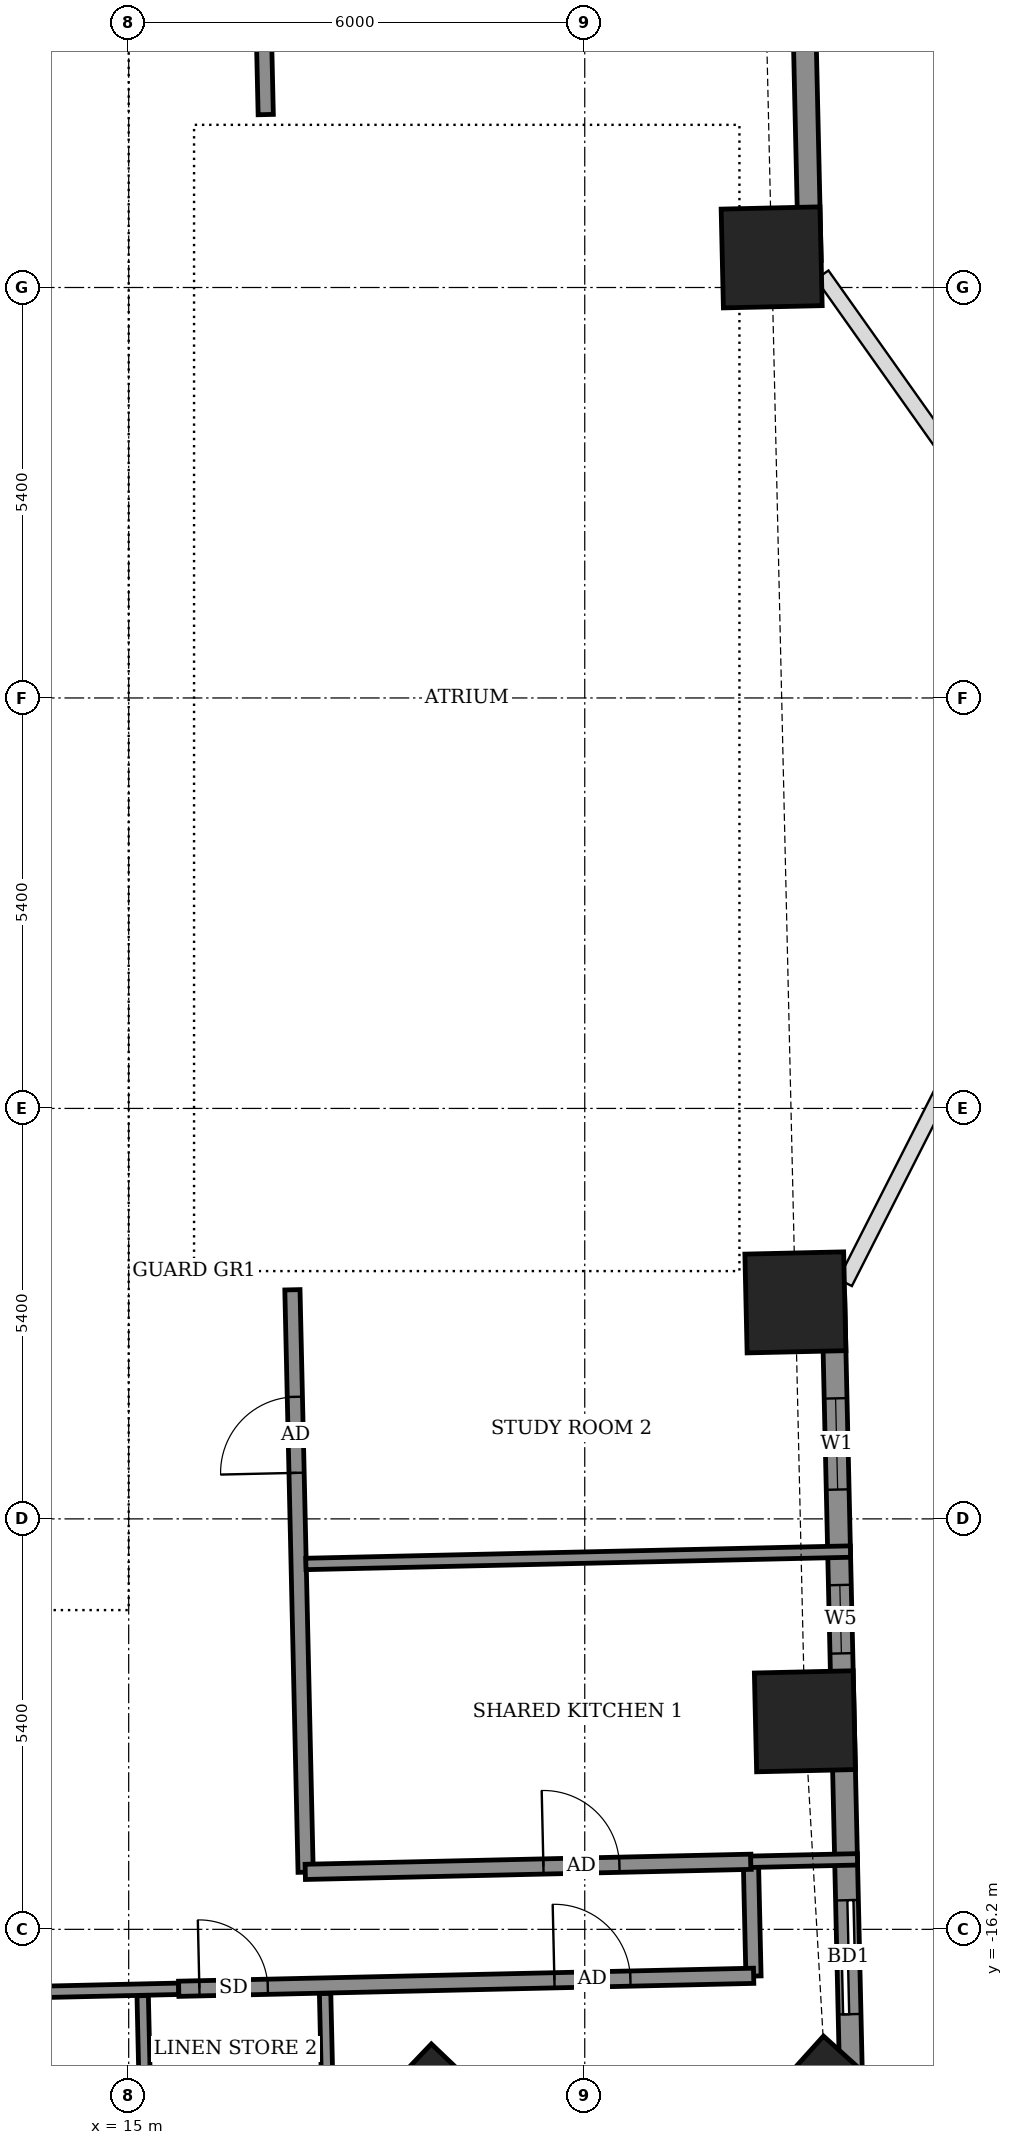
"""IFC4 building model, lengths in metres.
Left out: names, types, materials, properties, quantities, classifications, styles, units other than length and angle.
Written with IfcOpenShell. Run it as: python <this file> out.ifc"""

import sys

from ifc_helpers import new_model, si_unit, direction, frame, frame_2d, origin, origin_2d, place, context, subcontext, project, spatial, rectangle, extrude, element, fill, save


model = new_model("IFC4")
c1 = context("Model", 3, precision=1e-05, world=origin(), true_north=direction((0.0, 1.0)))
c2 = subcontext(c1, "Body", "Model", "MODEL_VIEW")
j1 = project(units=[si_unit("LENGTHUNIT", "METRE"), si_unit("PLANEANGLEUNIT", "RADIAN")], contexts=[c1])
p1 = place(None, origin())
s1 = spatial("IfcSite", under=j1, at=p1, CompositionType="ELEMENT")
p2 = place(p1, origin())
s2 = spatial("IfcBuilding", under=s1, at=p2, CompositionType="ELEMENT")
p3 = place(p2, frame((0.0, 0.0, 130.1)))
s3 = spatial("IfcBuildingStorey", under=s2, at=p3, CompositionType="ELEMENT", Elevation=130.1)
for number, where, z_axis, x_axis in (
    (1, (19.003, -18.627, -0.55), (0.0, 0.0, 1.0), (0.691, 0.723, 0.0)),
    (2, (24.188, -18.523, -0.55), (0.0, 0.0, 1.0), (0.67, 0.743, 0.0)),
    (3, (23.896, -13.463, -0.55), (0.0, 0.0, 1.0), (-0.023, 1.0, 0.0)),
    (4, (23.771, -7.952, -0.55), (0.0, 0.0, 1.0), (-0.023, 1.0, 0.0)),
    (5, (23.459, 5.796, -0.55), (0.0, 0.0, 1.0), (-0.023, 1.0, 0.0)),
):
    element("IfcColumn", number, at=place(p3, frame(where, z_axis=z_axis, x_axis=x_axis)), inside=s3, PredefinedType="COLUMN", context=c2, shape_type="SweptSolid", body=[
        extrude(rectangle(XDim=1.3, YDim=1.3, at=origin_2d()), origin(), (0.0, 0.0, 1.0), 3.6),
    ])
p4 = place(p3, frame((24.518, -18.812, 0.0), z_axis=(0.0, 0.0, 1.0), x_axis=(-0.02269451316, 0.999742446369, 0.0)))
e6 = element("IfcWall", 6, at=p4, inside=s3, PredefinedType="SOLIDWALL", context=c2, shape_type="SweptSolid", body=[
    extrude(rectangle(XDim=10.93, YDim=0.3, at=frame_2d((5.465, 0.0))), origin(), (0.0, 0.0, 1.0), 3.05),
])
p5 = place(p4, frame((1.496, 0.0, 0.0)))
e7 = element("IfcOpeningElement", 7, at=p5, cuts=e6, PredefinedType="OPENING", context=c2, shape_type="SweptSolid", body=[
    extrude(rectangle(XDim=1.5, YDim=2.4, at=frame_2d((0.75, 1.2))), frame((0.0, 0.16, 0.0), z_axis=(0.0, -1.0, 0.0), x_axis=(1.0, 0.0, 0.0)), (0.0, 0.0, 1.0), 0.32),
])
p6 = place(p4, frame((6.244, 0.0, 0.9)))
e8 = element("IfcOpeningElement", 8, at=p6, cuts=e6, PredefinedType="OPENING", context=c2, shape_type="SweptSolid", body=[
    extrude(rectangle(XDim=0.9, YDim=1.5, at=frame_2d((0.45, 0.75))), frame((0.0, 0.16, 0.0), z_axis=(0.0, -1.0, 0.0), x_axis=(1.0, 0.0, 0.0)), (0.0, 0.0, 1.0), 0.32),
])
p7 = place(p4, frame((8.4, 0.0, 0.9)))
e9 = element("IfcOpeningElement", 9, at=p7, cuts=e6, PredefinedType="OPENING", context=c2, shape_type="SweptSolid", body=[
    extrude(rectangle(XDim=1.2, YDim=1.5, at=frame_2d((0.6, 0.75))), frame((0.0, 0.16, 0.0), z_axis=(0.0, -1.0, 0.0), x_axis=(1.0, 0.0, 0.0)), (0.0, 0.0, 1.0), 0.32),
])
p8 = place(p3, frame((23.961, 5.752, 0.0), z_axis=(0.0, 0.0, 1.0), x_axis=(-0.022715362207, 0.999741972871, 0.0)))
e10 = element("IfcWall", 10, at=p8, inside=s3, PredefinedType="SOLIDWALL", context=c2, shape_type="SweptSolid", body=[
    extrude(rectangle(XDim=11.93, YDim=0.3, at=frame_2d((5.965, 0.0))), origin(), (0.0, 0.0, 1.0), 3.05),
])
p9 = place(p8, frame((3.228, 0.0, 0.0)))
e11 = element("IfcOpeningElement", 11, at=p9, cuts=e10, PredefinedType="OPENING", context=c2, shape_type="SweptSolid", body=[
    extrude(rectangle(XDim=1.5, YDim=2.4, at=frame_2d((0.75, 1.2))), frame((0.0, 0.16, 0.0), z_axis=(0.0, -1.0, 0.0), x_axis=(1.0, 0.0, 0.0)), (0.0, 0.0, 1.0), 0.32),
])
p10 = place(p8, frame((7.629, 0.0, 0.9)))
e12 = element("IfcOpeningElement", 12, at=p10, cuts=e10, PredefinedType="OPENING", context=c2, shape_type="SweptSolid", body=[
    extrude(rectangle(XDim=0.9, YDim=1.5, at=frame_2d((0.45, 0.75))), frame((0.0, 0.16, 0.0), z_axis=(0.0, -1.0, 0.0), x_axis=(1.0, 0.0, 0.0)), (0.0, 0.0, 1.0), 0.32),
])
p11 = place(p8, frame((9.316, 0.0, 0.9)))
e13 = element("IfcOpeningElement", 13, at=p11, cuts=e10, PredefinedType="OPENING", context=c2, shape_type="SweptSolid", body=[
    extrude(rectangle(XDim=1.2, YDim=1.5, at=frame_2d((0.6, 0.75))), frame((0.0, 0.16, 0.0), z_axis=(0.0, -1.0, 0.0), x_axis=(1.0, 0.0, 0.0)), (0.0, 0.0, 1.0), 0.32),
])
p12 = place(p3, frame((15.343, -24.072, 0.0), z_axis=(0.0, 0.0, 1.0), x_axis=(-0.022699227919, 0.999742339331, 0.0)))
e14 = element("IfcWall", 14, at=p12, inside=s3, PredefinedType="PARTITIONING", context=c2, shape_type="SweptSolid", body=[
    extrude(rectangle(XDim=7.002, YDim=0.15, at=frame_2d((3.501, 0.0))), origin(), (0.0, 0.0, 1.0), 2.55),
])
p13 = place(p3, frame((17.632, -19.142, 0.0), z_axis=(0.0, 0.0, 1.0), x_axis=(-0.022906293375, 0.999737616439, 0.0)))
e15 = element("IfcWall", 15, at=p13, inside=s3, PredefinedType="PARTITIONING", context=c2, shape_type="SweptSolid", body=[
    extrude(rectangle(XDim=2.1, YDim=0.15, at=frame_2d((1.05, 0.0))), origin(), (0.0, 0.0, 1.0), 3.05),
])
p14 = place(p3, frame((23.22, -16.815, 0.0), z_axis=(0.0, 0.0, 1.0), x_axis=(-0.022617910375, 0.999744182344, 0.0)))
e16 = element("IfcWall", 16, at=p14, inside=s3, PredefinedType="PARTITIONING", context=c2, shape_type="SweptSolid", body=[
    extrude(rectangle(XDim=1.5, YDim=0.2, at=frame_2d((0.75, 0.0))), origin(), (0.0, 0.0, 1.0), 3.05),
])
p15 = place(p3, frame((-14.871, -17.675, 0.0), z_axis=(0.0, 0.0, 1.0), x_axis=(0.999742359486, 0.02269834024, 0.0)))
e17 = element("IfcWall", 17, at=p15, inside=s3, PredefinedType="PARTITIONING", context=c2, shape_type="SweptSolid", body=[
    extrude(rectangle(XDim=30.536, YDim=0.15, at=frame_2d((15.268, 0.0))), origin(), (0.0, 0.0, 1.0), 3.05),
])
p16 = place(p15, frame((1.034, 0.0, 0.0)))
e18 = element("IfcOpeningElement", 18, at=p16, cuts=e17, PredefinedType="OPENING", context=c2, shape_type="SweptSolid", body=[
    extrude(rectangle(XDim=0.9, YDim=2.1, at=frame_2d((0.45, 1.05))), frame((0.0, 0.085, 0.0), z_axis=(0.0, -1.0, 0.0), x_axis=(1.0, 0.0, 0.0)), (0.0, 0.0, 1.0), 0.17),
])
p17 = place(p15, frame((7.659, 0.0, 0.0)))
e19 = element("IfcOpeningElement", 19, at=p17, cuts=e17, PredefinedType="OPENING", context=c2, shape_type="SweptSolid", body=[
    extrude(rectangle(XDim=0.9, YDim=2.1, at=frame_2d((0.45, 1.05))), frame((0.0, 0.085, 0.0), z_axis=(0.0, -1.0, 0.0), x_axis=(1.0, 0.0, 0.0)), (0.0, 0.0, 1.0), 0.17),
])
p18 = place(p15, frame((9.459, 0.0, 0.0)))
e20 = element("IfcOpeningElement", 20, at=p18, cuts=e17, PredefinedType="OPENING", context=c2, shape_type="SweptSolid", body=[
    extrude(rectangle(XDim=0.9, YDim=2.1, at=frame_2d((0.45, 1.05))), frame((0.0, 0.085, 0.0), z_axis=(0.0, -1.0, 0.0), x_axis=(1.0, 0.0, 0.0)), (0.0, 0.0, 1.0), 0.17),
])
p19 = place(p15, frame((16.084, 0.0, 0.0)))
e21 = element("IfcOpeningElement", 21, at=p19, cuts=e17, PredefinedType="OPENING", context=c2, shape_type="SweptSolid", body=[
    extrude(rectangle(XDim=0.9, YDim=2.1, at=frame_2d((0.45, 1.05))), frame((0.0, 0.085, 0.0), z_axis=(0.0, -1.0, 0.0), x_axis=(1.0, 0.0, 0.0)), (0.0, 0.0, 1.0), 0.17),
])
p20 = place(p15, frame((17.909, 0.0, 0.0)))
e22 = element("IfcOpeningElement", 22, at=p20, cuts=e17, PredefinedType="OPENING", context=c2, shape_type="SweptSolid", body=[
    extrude(rectangle(XDim=0.9, YDim=2.1, at=frame_2d((0.45, 1.05))), frame((0.0, 0.085, 0.0), z_axis=(0.0, -1.0, 0.0), x_axis=(1.0, 0.0, 0.0)), (0.0, 0.0, 1.0), 0.17),
])
p21 = place(p15, frame((24.509, 0.0, 0.0)))
e23 = element("IfcOpeningElement", 23, at=p21, cuts=e17, PredefinedType="OPENING", context=c2, shape_type="SweptSolid", body=[
    extrude(rectangle(XDim=0.9, YDim=2.1, at=frame_2d((0.45, 1.05))), frame((0.0, 0.085, 0.0), z_axis=(0.0, -1.0, 0.0), x_axis=(1.0, 0.0, 0.0)), (0.0, 0.0, 1.0), 0.17),
])
p22 = place(p15, frame((26.309, 0.0, 0.0)))
e24 = element("IfcOpeningElement", 24, at=p22, cuts=e17, PredefinedType="OPENING", context=c2, shape_type="SweptSolid", body=[
    extrude(rectangle(XDim=0.9, YDim=2.1, at=frame_2d((0.45, 1.05))), frame((0.0, 0.085, 0.0), z_axis=(0.0, -1.0, 0.0), x_axis=(1.0, 0.0, 0.0)), (0.0, 0.0, 1.0), 0.17),
])
p23 = place(p3, frame((15.658, -16.982, 0.0), z_axis=(0.0, 0.0, 1.0), x_axis=(0.99974485859, 0.022587999516, 0.0)))
e25 = element("IfcWall", 25, at=p23, inside=s3, PredefinedType="PARTITIONING", context=c2, shape_type="SweptSolid", body=[
    extrude(rectangle(XDim=7.566, YDim=0.2, at=frame_2d((3.783, 0.0))), origin(), (0.0, 0.0, 1.0), 3.05),
])
p24 = place(p23, frame((4.944, 0.0, 0.0)))
e26 = element("IfcOpeningElement", 26, at=p24, cuts=e25, PredefinedType="OPENING", context=c2, shape_type="SweptSolid", body=[
    extrude(rectangle(XDim=1.0, YDim=2.1, at=frame_2d((0.5, 1.05))), frame((0.0, 0.11, 0.0), z_axis=(0.0, -1.0, 0.0), x_axis=(1.0, 0.0, 0.0)), (0.0, 0.0, 1.0), 0.22),
])
p25 = place(p23, frame((0.272, 0.0, 0.0)))
e27 = element("IfcOpeningElement", 27, at=p25, cuts=e25, PredefinedType="OPENING", context=c2, shape_type="SweptSolid", body=[
    extrude(rectangle(XDim=0.9, YDim=2.1, at=frame_2d((0.45, 1.05))), frame((0.0, 0.11, 0.0), z_axis=(0.0, -1.0, 0.0), x_axis=(1.0, 0.0, 0.0)), (0.0, 0.0, 1.0), 0.22),
])
p26 = place(p3, frame((17.328, -15.448, 0.0), z_axis=(0.0, 0.0, 1.0), x_axis=(-0.022680883318, 0.999742755679, 0.0)))
e28 = element("IfcWall", 28, at=p26, inside=s3, PredefinedType="PARTITIONING", context=c2, shape_type="SweptSolid", body=[
    extrude(rectangle(XDim=7.664, YDim=0.2, at=frame_2d((3.832, 0.0))), origin(), (0.0, 0.0, 1.0), 3.05),
])
p27 = place(p26, frame((5.255, 0.0, 0.0)))
e29 = element("IfcOpeningElement", 29, at=p27, cuts=e28, PredefinedType="OPENING", context=c2, shape_type="SweptSolid", body=[
    extrude(rectangle(XDim=1.0, YDim=2.1, at=frame_2d((0.5, 1.05))), frame((0.0, 0.11, 0.0), z_axis=(0.0, -1.0, 0.0), x_axis=(1.0, 0.0, 0.0)), (0.0, 0.0, 1.0), 0.22),
])
p28 = place(p3, frame((17.323, -15.444, 0.0), z_axis=(0.0, 0.0, 1.0), x_axis=(0.999742758565, 0.022680756085, 0.0)))
e30 = element("IfcWall", 30, at=p28, inside=s3, PredefinedType="PARTITIONING", context=c2, shape_type="SweptSolid", body=[
    extrude(rectangle(XDim=5.866, YDim=0.2, at=frame_2d((2.933, 0.0))), origin(), (0.0, 0.0, 1.0), 3.05),
])
p29 = place(p28, frame((3.134, 0.0, 0.0)))
e31 = element("IfcOpeningElement", 31, at=p29, cuts=e30, PredefinedType="OPENING", context=c2, shape_type="SweptSolid", body=[
    extrude(rectangle(XDim=1.0, YDim=2.1, at=frame_2d((0.5, 1.05))), frame((0.0, 0.11, 0.0), z_axis=(0.0, -1.0, 0.0), x_axis=(1.0, 0.0, 0.0)), (0.0, 0.0, 1.0), 0.22),
])
p30 = place(p3, frame((23.184, -15.311, 0.0), z_axis=(0.0, 0.0, 1.0), x_axis=(0.999740577356, 0.022776698371, 0.0)))
e32 = element("IfcWall", 32, at=p30, inside=s3, PredefinedType="PARTITIONING", context=c2, shape_type="SweptSolid", body=[
    extrude(rectangle(XDim=1.404, YDim=0.15, at=frame_2d((0.702, 0.0))), origin(), (0.0, 0.0, 1.0), 2.55),
])
p31 = place(p3, frame((17.331, -11.393, 0.0), z_axis=(0.0, 0.0, 1.0), x_axis=(0.999741061159, 0.022755452803, 0.0)))
e33 = element("IfcWall", 33, at=p31, inside=s3, PredefinedType="PARTITIONING", context=c2, shape_type="SweptSolid", body=[
    extrude(rectangle(XDim=7.167, YDim=0.15, at=frame_2d((3.583, 0.0))), origin(), (0.0, 0.0, 1.0), 2.55),
])
p32 = place(p3, frame((16.803, 7.675, 0.0), z_axis=(0.0, 0.0, 1.0), x_axis=(-0.022667483124, 0.999743059595, 0.0)))
e34 = element("IfcWall", 34, at=p32, inside=s3, PredefinedType="PARTITIONING", context=c2, shape_type="SweptSolid", body=[
    extrude(rectangle(XDim=5.245, YDim=0.2, at=frame_2d((2.623, 0.0))), origin(), (0.0, 0.0, 1.0), 3.05),
])
p33 = place(p3, frame((-14.8, -11.3, 0.0), z_axis=(0.0, 0.0, 1.0), x_axis=(1.0, 0.0, 0.0)))
e35 = element("IfcWall", 35, at=p33, inside=s3, PredefinedType="SHEAR", context=c2, shape_type="SweptSolid", body=[
    extrude(rectangle(XDim=29.6, YDim=1.0, at=frame_2d((14.8, 0.0))), origin(), (0.0, 0.0, 1.0), 3.6),
])
p34 = place(p3, frame((14.3, -10.8, 0.0), z_axis=(0.0, 0.0, 1.0), x_axis=(0.0, 1.0, 0.0)))
e36 = element("IfcWall", 36, at=p34, inside=s3, PredefinedType="SHEAR", context=c2, shape_type="SweptSolid", body=[
    extrude(rectangle(XDim=21.6, YDim=1.0, at=frame_2d((10.8, 0.0))), origin(), (0.0, 0.0, 1.0), 3.6),
])
p35 = place(p34, frame((1.2, 0.0, 0.0)))
e37 = element("IfcOpeningElement", 37, at=p35, cuts=e36, PredefinedType="OPENING", context=c2, shape_type="SweptSolid", body=[
    extrude(rectangle(XDim=1.2, YDim=2.1, at=frame_2d((0.6, 1.05))), frame((0.0, 0.51, 0.0), z_axis=(0.0, -1.0, 0.0), x_axis=(1.0, 0.0, 0.0)), (0.0, 0.0, 1.0), 1.02),
])
p36 = place(p5, origin())
e38 = element("IfcDoor", 38, at=p36, inside=s3, OperationType="SLIDING_TO_LEFT", PredefinedType="DOOR", context=c2, shape_type="SweptSolid", body=[
    extrude(rectangle(XDim=1.5, YDim=2.4, at=frame_2d((0.75, 1.2))), frame((0.0, 0.025, 0.0), z_axis=(0.0, -1.0, 0.0), x_axis=(1.0, 0.0, 0.0)), (0.0, 0.0, 1.0), 0.05),
])
fill(e7, e38)
p37 = place(p6, origin())
e39 = element("IfcWindow", 39, at=p37, inside=s3, PartitioningType="SINGLE_PANEL", PredefinedType="WINDOW", context=c2, shape_type="SweptSolid", body=[
    extrude(rectangle(XDim=0.9, YDim=1.5, at=frame_2d((0.45, 0.75))), frame((0.0, 0.03, 0.0), z_axis=(0.0, -1.0, 0.0), x_axis=(1.0, 0.0, 0.0)), (0.0, 0.0, 1.0), 0.06),
])
fill(e8, e39)
p38 = place(p7, origin())
e40 = element("IfcWindow", 40, at=p38, inside=s3, PartitioningType="SINGLE_PANEL", PredefinedType="WINDOW", context=c2, shape_type="SweptSolid", body=[
    extrude(rectangle(XDim=1.2, YDim=1.5, at=frame_2d((0.6, 0.75))), frame((0.0, 0.03, 0.0), z_axis=(0.0, -1.0, 0.0), x_axis=(1.0, 0.0, 0.0)), (0.0, 0.0, 1.0), 0.06),
])
fill(e9, e40)
p39 = place(p24, origin())
e41 = element("IfcDoor", 41, at=p39, inside=s3, OperationType="SINGLE_SWING_RIGHT", PredefinedType="DOOR", context=c2, shape_type="SweptSolid", body=[
    extrude(rectangle(XDim=1.0, YDim=2.1, at=frame_2d((0.5, 1.05))), frame((0.0, 0.025, 0.0), z_axis=(0.0, -1.0, 0.0), x_axis=(1.0, 0.0, 0.0)), (0.0, 0.0, 1.0), 0.05),
])
fill(e26, e41)
p40 = place(p25, origin())
e42 = element("IfcDoor", 42, at=p40, inside=s3, OperationType="SINGLE_SWING_RIGHT", PredefinedType="DOOR", context=c2, shape_type="SweptSolid", body=[
    extrude(rectangle(XDim=0.9, YDim=2.1, at=frame_2d((0.45, 1.05))), frame((0.0, 0.025, 0.0), z_axis=(0.0, -1.0, 0.0), x_axis=(1.0, 0.0, 0.0)), (0.0, 0.0, 1.0), 0.05),
])
fill(e27, e42)
p41 = place(p29, origin())
e43 = element("IfcDoor", 43, at=p41, inside=s3, OperationType="SINGLE_SWING_LEFT", PredefinedType="DOOR", context=c2, shape_type="SweptSolid", body=[
    extrude(rectangle(XDim=1.0, YDim=2.1, at=frame_2d((0.5, 1.05))), frame((0.0, 0.025, 0.0), z_axis=(0.0, -1.0, 0.0), x_axis=(1.0, 0.0, 0.0)), (0.0, 0.0, 1.0), 0.05),
])
fill(e31, e43)
p42 = place(p27, origin())
e44 = element("IfcDoor", 44, at=p42, inside=s3, OperationType="SINGLE_SWING_RIGHT", PredefinedType="DOOR", context=c2, shape_type="SweptSolid", body=[
    extrude(rectangle(XDim=1.0, YDim=2.1, at=frame_2d((0.5, 1.05))), frame((0.0, 0.025, 0.0), z_axis=(0.0, -1.0, 0.0), x_axis=(1.0, 0.0, 0.0)), (0.0, 0.0, 1.0), 0.05),
])
fill(e29, e44)
p43 = place(p35, origin())
e45 = element("IfcDoor", 45, at=p43, inside=s3, OperationType="DOUBLE_DOOR_SINGLE_SWING", PredefinedType="DOOR", context=c2, shape_type="SweptSolid", body=[
    extrude(rectangle(XDim=1.2, YDim=2.1, at=frame_2d((0.6, 1.05))), frame((0.0, 0.025, 0.0), z_axis=(0.0, -1.0, 0.0), x_axis=(1.0, 0.0, 0.0)), (0.0, 0.0, 1.0), 0.05),
])
fill(e37, e45)
save(model, sys.argv[1])
